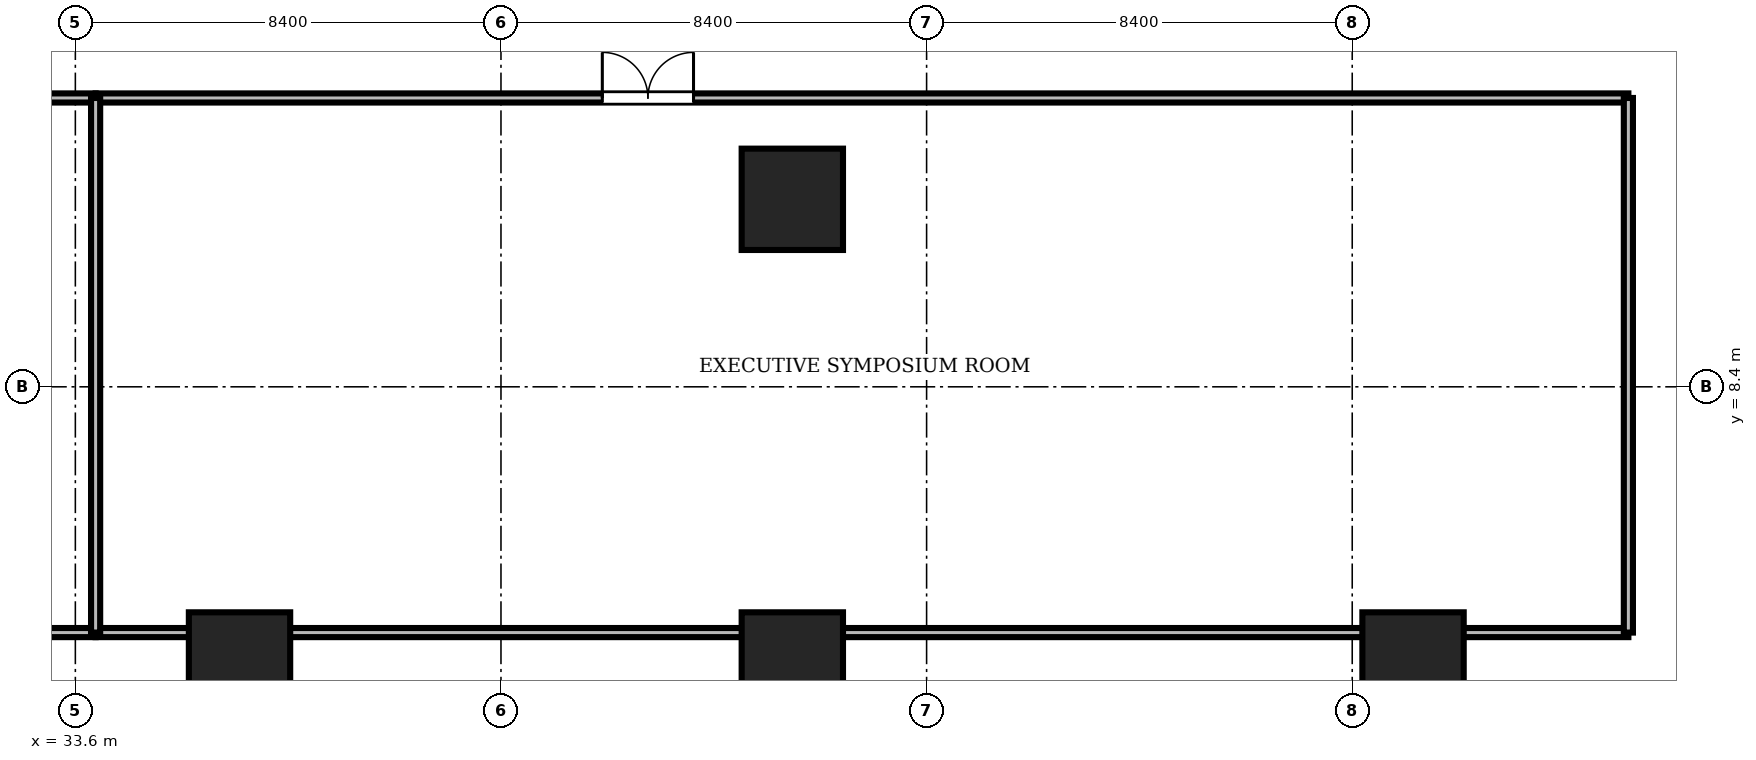
"""IFC4 building model, lengths in metres.
Left out: names, types, materials, properties, quantities, classifications, styles, units other than length and angle.
Written with IfcOpenShell. Run it as: python <this file> out.ifc"""

import sys

from ifc_helpers import new_model, si_unit, direction, frame, frame_2d, origin, origin_2d, place, context, subcontext, project, spatial, rectangle, extrude, source, transform, mapped, element, fill, save


model = new_model("IFC4")
c1 = context("Model", 3, precision=1e-05, world=origin(), true_north=direction((0.0, 1.0)))
c2 = subcontext(c1, "Body", "Model", "MODEL_VIEW")
j1 = project(units=[si_unit("LENGTHUNIT", "METRE"), si_unit("PLANEANGLEUNIT", "RADIAN")], contexts=[c1])
p1 = place(None, origin())
s1 = spatial("IfcSite", under=j1, at=p1, CompositionType="ELEMENT")
p2 = place(p1, origin())
s2 = spatial("IfcBuilding", under=s1, at=p2, CompositionType="ELEMENT")
p3 = place(p2, frame((0.0, 0.0, 11.4)))
s3 = spatial("IfcBuildingStorey", under=s2, at=p3, CompositionType="ELEMENT", Elevation=11.4)
m1 = source(origin(), c2, "Body", "SweptSolid", [
    extrude(rectangle(XDim=2.0, YDim=2.0, at=origin_2d()), origin(), (0.0, 0.0, 1.0), 5.2),
])
for number, where, z_axis, x_axis in (
    (1, (36.84, 2.95, 0.0), (0.0, 0.0, 1.0), (1.0, 0.0, 0.0)),
    (2, (47.75, 2.95, 0.0), (0.0, 0.0, 1.0), (1.0, 0.0, 0.0)),
    (3, (60.0, 2.95, 0.0), (0.0, 0.0, 1.0), (1.0, 0.0, 0.0)),
    (4, (47.75, 12.1, 0.0), (0.0, 0.0, 1.0), (1.0, 0.0, 0.0)),
):
    element("IfcColumn", number, at=place(p3, frame(where, z_axis=z_axis, x_axis=x_axis)), inside=s3, PredefinedType="COLUMN", context=c2, shape_type="MappedRepresentation", body=[
        mapped(m1, transform((0.0, 0.0, 0.0), scale=1.0)),
    ])
m2 = source(origin(), c2, "Body", "SweptSolid", [
    extrude(rectangle(XDim=30.25, YDim=0.18, at=frame_2d((15.125, 0.0))), origin(), (0.0, 0.0, 1.0), 3.392),
])
p4 = place(p3, frame((3.75, 14.1, 0.0), z_axis=(0.0, 0.0, 1.0), x_axis=(1.0, 0.0, 0.0)))
e5 = element("IfcWall", 5, at=p4, inside=s3, PredefinedType="PARTITIONING", context=c2, shape_type="MappedRepresentation", body=[
    mapped(m2, transform((0.0, 0.0, 0.0), scale=1.0)),
])
m3 = source(origin(), c2, "Body", "SweptSolid", [
    extrude(rectangle(XDim=1.8, YDim=2.4, at=frame_2d((0.9, 1.2))), frame((0.0, 0.1, 0.0), z_axis=(0.0, -1.0, 0.0), x_axis=(1.0, 0.0, 0.0)), (0.0, 0.0, 1.0), 0.2),
])
p5 = place(p4, frame((18.0, 0.0, 0.0)))
e6 = element("IfcOpeningElement", 6, at=p5, cuts=e5, PredefinedType="OPENING", context=c2, shape_type="MappedRepresentation", body=[
    mapped(m3, transform((0.0, 0.0, 0.0), scale=1.0)),
])
p6 = place(p3, frame((34.0, 14.1, 0.0), z_axis=(0.0, 0.0, 1.0), x_axis=(1.0, 0.0, 0.0)))
e7 = element("IfcWall", 7, at=p6, inside=s3, PredefinedType="PARTITIONING", context=c2, shape_type="MappedRepresentation", body=[
    mapped(m2, transform((0.0, 0.0, 0.0), scale=1.0)),
])
p7 = place(p6, frame((10.0, 0.0, 0.0)))
e8 = element("IfcOpeningElement", 8, at=p7, cuts=e7, PredefinedType="OPENING", context=c2, shape_type="MappedRepresentation", body=[
    mapped(m3, transform((0.0, 0.0, 0.0), scale=1.0)),
])
for number, where, z_axis, x_axis in (
    (9, (3.75, 3.55, 0.0), (0.0, 0.0, 1.0), (1.0, 0.0, 0.0)),
    (10, (34.0, 3.55, 0.0), (0.0, 0.0, 1.0), (1.0, 0.0, 0.0)),
):
    element("IfcWall", number, at=place(p3, frame(where, z_axis=z_axis, x_axis=x_axis)), inside=s3, PredefinedType="PARTITIONING", context=c2, shape_type="MappedRepresentation", body=[
        mapped(m2, transform((0.0, 0.0, 0.0), scale=1.0)),
    ])
m4 = source(origin(), c2, "Body", "SweptSolid", [
    extrude(rectangle(XDim=10.55, YDim=0.18, at=frame_2d((5.275, 0.0))), origin(), (0.0, 0.0, 1.0), 5.2),
])
p8 = place(p3, frame((34.0, 3.55, 0.0), z_axis=(0.0, 0.0, 1.0), x_axis=(0.0, 1.0, 0.0)))
e11 = element("IfcWall", 11, at=p8, inside=s3, PredefinedType="PARTITIONING", context=c2, shape_type="MappedRepresentation", body=[
    mapped(m4, transform((0.0, 0.0, 0.0), scale=1.0)),
])
m5 = source(origin(), c2, "Body", "SweptSolid", [
    extrude(rectangle(XDim=10.55, YDim=0.18, at=frame_2d((5.275, 0.0))), origin(), (0.0, 0.0, 1.0), 4.792),
])
p9 = place(p3, frame((64.25, 3.55, 0.0), z_axis=(0.0, 0.0, 1.0), x_axis=(0.0, 1.0, 0.0)))
e12 = element("IfcWall", 12, at=p9, inside=s3, PredefinedType="PARTITIONING", context=c2, shape_type="MappedRepresentation", body=[
    mapped(m5, transform((0.0, 0.0, 0.0), scale=1.0)),
])
m6 = source(origin(), c2, "Body", "SweptSolid", [
    extrude(rectangle(XDim=1.8, YDim=2.4, at=frame_2d((0.9, 1.2))), frame((0.0, 0.025, 0.0), z_axis=(0.0, -1.0, 0.0), x_axis=(1.0, 0.0, 0.0)), (0.0, 0.0, 1.0), 0.05),
])
p10 = place(p7, origin())
e13 = element("IfcDoor", 13, at=p10, inside=s3, OperationType="DOUBLE_DOOR_SINGLE_SWING", PredefinedType="DOOR", context=c2, shape_type="MappedRepresentation", body=[
    mapped(m6, transform((0.0, 0.0, 0.0), scale=1.0)),
])
fill(e8, e13)
save(model, sys.argv[1])
